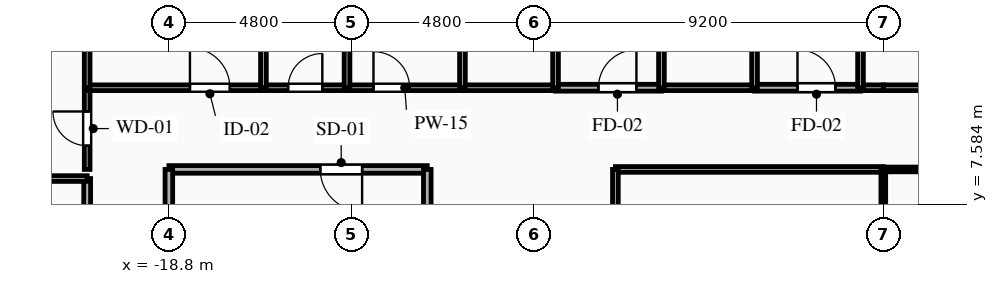
"""IFC4 building model, lengths in metres.
Left out: names, types, materials, properties, quantities, classifications, styles, units other than length and angle.
Written with IfcOpenShell. Run it as: python <this file> out.ifc"""

import sys

from ifc_helpers import new_model, si_unit, direction, frame, frame_2d, origin, place, context, subcontext, project, spatial, rectangle, extrude, element, fill, save


model = new_model("IFC4")
c1 = context("Model", 3, precision=1e-05, world=origin(), true_north=direction((0.0, 1.0)))
c2 = subcontext(c1, "Body", "Model", "MODEL_VIEW")
j1 = project(units=[si_unit("LENGTHUNIT", "METRE"), si_unit("PLANEANGLEUNIT", "RADIAN")], contexts=[c1])
p1 = place(None, origin())
s1 = spatial("IfcSite", under=j1, at=p1, CompositionType="ELEMENT")
p2 = place(p1, origin())
s2 = spatial("IfcBuilding", under=s1, at=p2, CompositionType="ELEMENT")
p3 = place(p2, frame((0.0, 0.0, 144.4)))
s3 = spatial("IfcBuildingStorey", under=s2, at=p3, CompositionType="ELEMENT", Elevation=144.4)
p4 = place(p3, frame((-12.0, 8.5, 0.0), z_axis=(0.0, 0.0, 1.0), x_axis=(-1.0, 0.0, 0.0)))
e1 = element("IfcWall", 1, at=p4, inside=s3, PredefinedType="PARTITIONING", context=c2, shape_type="SweptSolid", body=[
    extrude(rectangle(XDim=6.8, YDim=0.2, at=frame_2d((3.4, 0.0))), origin(), (0.0, 0.0, 1.0), 3.04),
])
p5 = place(p4, frame((1.715, 0.0, 0.0)))
e2 = element("IfcOpeningElement", 2, at=p5, cuts=e1, PredefinedType="OPENING", context=c2, shape_type="SweptSolid", body=[
    extrude(rectangle(XDim=1.1, YDim=2.15, at=frame_2d((0.55, 1.075))), frame((0.0, 0.11, 0.0), z_axis=(0.0, -1.0, 0.0), x_axis=(1.0, 0.0, 0.0)), (0.0, 0.0, 1.0), 0.22),
])
p6 = place(p3, frame((-18.8, 8.5, 0.0), z_axis=(0.0, 0.0, 1.0), x_axis=(0.0, -1.0, 0.0)))
e3 = element("IfcWall", 3, at=p6, inside=s3, PredefinedType="PARTITIONING", context=c2, shape_type="SweptSolid", body=[
    extrude(rectangle(XDim=2.9, YDim=0.2, at=frame_2d((1.45, 0.0))), origin(), (0.0, 0.0, 1.0), 2.525),
])
p7 = place(p3, frame((-12.0, 5.6, 0.0), z_axis=(0.0, 0.0, 1.0), x_axis=(0.0, 1.0, 0.0)))
e4 = element("IfcWall", 4, at=p7, inside=s3, PredefinedType="PARTITIONING", context=c2, shape_type="SweptSolid", body=[
    extrude(rectangle(XDim=2.9, YDim=0.2, at=frame_2d((1.45, 0.0))), origin(), (0.0, 0.0, 1.0), 3.04),
])
p8 = place(p3, frame((-20.95, 8.5, 0.0), z_axis=(0.0, 0.0, 1.0), x_axis=(0.0, 1.0, 0.0)))
e5 = element("IfcWall", 5, at=p8, inside=s3, PredefinedType="PARTITIONING", context=c2, shape_type="SweptSolid", body=[
    extrude(rectangle(XDim=2.15, YDim=0.15, at=frame_2d((1.075, 0.0))), origin(), (0.0, 0.0, 1.0), 3.04),
])
p9 = place(p8, frame((0.625, 0.0, 0.0)))
e6 = element("IfcOpeningElement", 6, at=p9, cuts=e5, PredefinedType="OPENING", context=c2, shape_type="SweptSolid", body=[
    extrude(rectangle(XDim=0.9, YDim=2.1, at=frame_2d((0.45, 1.05))), frame((0.0, 0.085, 0.0), z_axis=(0.0, -1.0, 0.0), x_axis=(1.0, 0.0, 0.0)), (0.0, 0.0, 1.0), 0.17),
])
p10 = place(p3, frame((-20.95, 10.65, 0.0), z_axis=(0.0, 0.0, 1.0), x_axis=(1.0, 0.0, 0.0)))
e7 = element("IfcWall", 7, at=p10, inside=s3, PredefinedType="PARTITIONING", context=c2, shape_type="SweptSolid", body=[
    extrude(rectangle(XDim=4.638, YDim=0.15, at=frame_2d((2.319, 0.0))), origin(), (0.0, 0.0, 1.0), 3.04),
])
p11 = place(p10, frame((2.705, 0.0, 0.0)))
e8 = element("IfcOpeningElement", 8, at=p11, cuts=e7, PredefinedType="OPENING", context=c2, shape_type="SweptSolid", body=[
    extrude(rectangle(XDim=1.05, YDim=2.15, at=frame_2d((0.525, 1.075))), frame((0.0, 0.085, 0.0), z_axis=(0.0, -1.0, 0.0), x_axis=(1.0, 0.0, 0.0)), (0.0, 0.0, 1.0), 0.17),
])
p12 = place(p3, frame((-16.312, 10.65, 0.0), z_axis=(0.0, 0.0, 1.0), x_axis=(1.0, 0.0, 0.0)))
e9 = element("IfcWall", 9, at=p12, inside=s3, PredefinedType="PLUMBINGWALL", context=c2, shape_type="SweptSolid", body=[
    extrude(rectangle(XDim=2.2, YDim=0.15, at=frame_2d((1.1, 0.0))), origin(), (0.0, 0.0, 1.0), 3.04),
])
p13 = place(p12, frame((0.65, 0.0, 0.0)))
e10 = element("IfcOpeningElement", 10, at=p13, cuts=e9, PredefinedType="OPENING", context=c2, shape_type="SweptSolid", body=[
    extrude(rectangle(XDim=0.9, YDim=2.1, at=frame_2d((0.45, 1.05))), frame((0.0, 0.085, 0.0), z_axis=(0.0, -1.0, 0.0), x_axis=(1.0, 0.0, 0.0)), (0.0, 0.0, 1.0), 0.17),
])
p14 = place(p3, frame((-14.112, 10.65, 0.0), z_axis=(0.0, 0.0, 1.0), x_axis=(1.0, 0.0, 0.0)))
e11 = element("IfcWall", 11, at=p14, inside=s3, PredefinedType="PARTITIONING", context=c2, shape_type="SweptSolid", body=[
    extrude(rectangle(XDim=3.037, YDim=0.15, at=frame_2d((1.519, 0.0))), origin(), (0.0, 0.0, 1.0), 3.04),
])
p15 = place(p14, frame((0.696, 0.0, 0.0)))
e12 = element("IfcOpeningElement", 12, at=p15, cuts=e11, PredefinedType="OPENING", context=c2, shape_type="SweptSolid", body=[
    extrude(rectangle(XDim=0.95, YDim=2.1, at=frame_2d((0.475, 1.05))), frame((0.0, 0.085, 0.0), z_axis=(0.0, -1.0, 0.0), x_axis=(1.0, 0.0, 0.0)), (0.0, 0.0, 1.0), 0.17),
])
p16 = place(p3, frame((-8.625, 10.65, 0.0), z_axis=(0.0, 0.0, 1.0), x_axis=(1.0, 0.0, 0.0)))
e13 = element("IfcWall", 13, at=p16, inside=s3, PredefinedType="PARTITIONING", context=c2, shape_type="SweptSolid", body=[
    extrude(rectangle(XDim=2.787, YDim=0.18, at=frame_2d((1.394, 0.0))), origin(), (0.0, 0.0, 1.0), 3.04),
])
p17 = place(p16, frame((1.129, 0.0, 0.0)))
e14 = element("IfcOpeningElement", 14, at=p17, cuts=e13, PredefinedType="OPENING", context=c2, shape_type="SweptSolid", body=[
    extrude(rectangle(XDim=1.0, YDim=2.15, at=frame_2d((0.5, 1.075))), frame((0.0, 0.1, 0.0), z_axis=(0.0, -1.0, 0.0), x_axis=(1.0, 0.0, 0.0)), (0.0, 0.0, 1.0), 0.2),
])
p18 = place(p3, frame((-11.075, 10.65, 0.0), z_axis=(0.0, 0.0, 1.0), x_axis=(1.0, 0.0, 0.0)))
e15 = element("IfcWall", 15, at=p18, inside=s3, PredefinedType="PLUMBINGWALL", context=c2, shape_type="SweptSolid", body=[
    extrude(rectangle(XDim=2.45, YDim=0.15, at=frame_2d((1.225, 0.0))), origin(), (0.0, 0.0, 1.0), 3.04),
])
p19 = place(p3, frame((-3.388, 10.65, 0.0), z_axis=(0.0, 0.0, 1.0), x_axis=(1.0, 0.0, 0.0)))
e16 = element("IfcWall", 16, at=p19, inside=s3, PredefinedType="PARTITIONING", context=c2, shape_type="SweptSolid", body=[
    extrude(rectangle(XDim=2.788, YDim=0.18, at=frame_2d((1.394, 0.0))), origin(), (0.0, 0.0, 1.0), 3.04),
])
p20 = place(p19, frame((1.129, 0.0, 0.0)))
e17 = element("IfcOpeningElement", 17, at=p20, cuts=e16, PredefinedType="OPENING", context=c2, shape_type="SweptSolid", body=[
    extrude(rectangle(XDim=1.0, YDim=2.15, at=frame_2d((0.5, 1.075))), frame((0.0, 0.1, 0.0), z_axis=(0.0, -1.0, 0.0), x_axis=(1.0, 0.0, 0.0)), (0.0, 0.0, 1.0), 0.2),
])
p21 = place(p3, frame((-5.838, 10.65, 0.0), z_axis=(0.0, 0.0, 1.0), x_axis=(1.0, 0.0, 0.0)))
e18 = element("IfcWall", 18, at=p21, inside=s3, PredefinedType="PLUMBINGWALL", context=c2, shape_type="SweptSolid", body=[
    extrude(rectangle(XDim=2.45, YDim=0.15, at=frame_2d((1.225, 0.0))), origin(), (0.0, 0.0, 1.0), 3.04),
])
p22 = place(p3, frame((-0.6, 10.65, 0.0), z_axis=(0.0, 0.0, 1.0), x_axis=(1.0, 0.0, 0.0)))
e19 = element("IfcWall", 19, at=p22, inside=s3, PredefinedType="PLUMBINGWALL", context=c2, shape_type="SweptSolid", body=[
    extrude(rectangle(XDim=0.6, YDim=0.15, at=frame_2d((0.3, 0.0))), origin(), (0.0, 0.0, 1.0), 3.04),
])
p23 = place(p3, frame((0.0, 8.5, 0.0), z_axis=(0.0, 0.0, 1.0), x_axis=(-1.0, 0.0, 0.0)))
e20 = element("IfcWall", 20, at=p23, inside=s3, PredefinedType="PARTITIONING", context=c2, shape_type="SweptSolid", body=[
    extrude(rectangle(XDim=7.05, YDim=0.15, at=frame_2d((3.525, 0.0))), origin(), (0.0, 0.0, 1.0), 3.04),
])
p24 = place(p3, frame((0.0, 10.65, 0.0), z_axis=(0.0, 0.0, 1.0), x_axis=(1.0, 0.0, 0.0)))
e21 = element("IfcWall", 21, at=p24, inside=s3, PredefinedType="PLUMBINGWALL", context=c2, shape_type="SweptSolid", body=[
    extrude(rectangle(XDim=1.85, YDim=0.15, at=frame_2d((0.925, 0.0))), origin(), (0.0, 0.0, 1.0), 3.04),
])
p25 = place(p3, frame((7.05, 8.5, 0.0), z_axis=(0.0, 0.0, 1.0), x_axis=(-1.0, 0.0, 0.0)))
e22 = element("IfcWall", 22, at=p25, inside=s3, PredefinedType="PARTITIONING", context=c2, shape_type="SweptSolid", body=[
    extrude(rectangle(XDim=7.05, YDim=0.125, at=frame_2d((3.525, 0.0))), origin(), (0.0, 0.0, 1.0), 3.04),
])
p26 = place(p3, frame((-20.95, -1.31, 0.0), z_axis=(0.0, 0.0, 1.0), x_axis=(0.0, 1.0, 0.0)))
e23 = element("IfcWall", 23, at=p26, inside=s3, PredefinedType="PARTITIONING", context=c2, shape_type="SweptSolid", body=[
    extrude(rectangle(XDim=9.57, YDim=0.18, at=frame_2d((4.785, 0.0))), origin(), (0.0, 0.0, 1.0), 3.04),
])
p27 = place(p26, frame((1.506, 0.0, 0.0)))
e24 = element("IfcOpeningElement", 24, at=p27, cuts=e23, PredefinedType="OPENING", context=c2, shape_type="SweptSolid", body=[
    extrude(rectangle(XDim=1.0, YDim=2.15, at=frame_2d((0.5, 1.075))), frame((0.0, 0.1, 0.0), z_axis=(0.0, -1.0, 0.0), x_axis=(1.0, 0.0, 0.0)), (0.0, 0.0, 1.0), 0.2),
])
p28 = place(p3, frame((-7.05, 8.5, 0.0), z_axis=(0.0, 0.0, 1.0), x_axis=(0.0, -1.0, 0.0)))
e25 = element("IfcWall", 25, at=p28, inside=s3, PredefinedType="PARTITIONING", context=c2, shape_type="SweptSolid", body=[
    extrude(rectangle(XDim=9.3, YDim=0.15, at=frame_2d((4.65, 0.0))), origin(), (0.0, 0.0, 1.0), 3.04),
])
p29 = place(p28, frame((6.784, 0.0, 0.0)))
e26 = element("IfcOpeningElement", 26, at=p29, cuts=e25, PredefinedType="OPENING", context=c2, shape_type="SweptSolid", body=[
    extrude(rectangle(XDim=1.05, YDim=2.15, at=frame_2d((0.525, 1.075))), frame((0.0, 0.085, 0.0), z_axis=(0.0, -1.0, 0.0), x_axis=(1.0, 0.0, 0.0)), (0.0, 0.0, 1.0), 0.17),
])
p30 = place(p3, frame((-24.765, 8.26, 0.0), z_axis=(0.0, 0.0, 1.0), x_axis=(1.0, 0.0, 0.0)))
e27 = element("IfcWall", 27, at=p30, inside=s3, PredefinedType="PARTITIONING", context=c2, shape_type="SweptSolid", body=[
    extrude(rectangle(XDim=3.815, YDim=0.15, at=frame_2d((1.907, 0.0))), origin(), (0.0, 0.0, 1.0), 3.04),
])
p31 = place(p3, frame((-20.95, 20.4, 0.0), z_axis=(0.0, 0.0, 1.0), x_axis=(0.0, -1.0, 0.0)))
e28 = element("IfcWall", 28, at=p31, inside=s3, PredefinedType="PARTITIONING", context=c2, shape_type="SweptSolid", body=[
    extrude(rectangle(XDim=9.75, YDim=0.15, at=frame_2d((4.875, 0.0))), origin(), (0.0, 0.0, 1.0), 3.04),
])
for number, where, z_axis, x_axis in (
    (29, (-16.312, 20.4, 0.0), (0.0, 0.0, 1.0), (0.0, -1.0, 0.0)),
    (30, (-14.112, 20.4, 0.0), (0.0, 0.0, 1.0), (0.0, -1.0, 0.0)),
):
    element("IfcWall", number, at=place(p3, frame(where, z_axis=z_axis, x_axis=x_axis)), inside=s3, PredefinedType="PLUMBINGWALL", context=c2, shape_type="SweptSolid", body=[
        extrude(rectangle(XDim=9.75, YDim=0.15, at=frame_2d((4.875, 0.0))), origin(), (0.0, 0.0, 1.0), 3.04),
    ])
for number, where, z_axis, x_axis in (
    (31, (-11.075, 12.8, 0.0), (0.0, 0.0, 1.0), (0.0, -1.0, 0.0)),
    (32, (-8.625, 10.65, 0.0), (0.0, 0.0, 1.0), (0.0, 1.0, 0.0)),
    (33, (-5.838, 12.8, 0.0), (0.0, 0.0, 1.0), (0.0, -1.0, 0.0)),
    (34, (-3.388, 10.65, 0.0), (0.0, 0.0, 1.0), (0.0, 1.0, 0.0)),
    (35, (-0.6, 12.8, 0.0), (0.0, 0.0, 1.0), (0.0, -1.0, 0.0)),
):
    element("IfcWall", number, at=place(p3, frame(where, z_axis=z_axis, x_axis=x_axis)), inside=s3, PredefinedType="PLUMBINGWALL", context=c2, shape_type="SweptSolid", body=[
        extrude(rectangle(XDim=2.15, YDim=0.15, at=frame_2d((1.075, 0.0))), origin(), (0.0, 0.0, 1.0), 3.04),
    ])
p32 = place(p3, frame((0.0, 8.5, 0.0), z_axis=(0.0, 0.0, 1.0), x_axis=(0.0, -1.0, 0.0)))
e36 = element("IfcWall", 36, at=p32, inside=s3, PredefinedType="PARTITIONING", context=c2, shape_type="SweptSolid", body=[
    extrude(rectangle(XDim=9.3, YDim=0.125, at=frame_2d((4.65, 0.0))), origin(), (0.0, 0.0, 1.0), 3.04),
])
p33 = place(p5, origin())
e37 = element("IfcDoor", 37, at=p33, inside=s3, OperationType="SINGLE_SWING_LEFT", PredefinedType="DOOR", context=c2, shape_type="SweptSolid", body=[
    extrude(rectangle(XDim=1.1, YDim=2.15, at=frame_2d((0.55, 1.075))), frame((0.0, 0.025, 0.0), z_axis=(0.0, -1.0, 0.0), x_axis=(1.0, 0.0, 0.0)), (0.0, 0.0, 1.0), 0.05),
])
fill(e2, e37)
p34 = place(p9, origin())
e38 = element("IfcDoor", 38, at=p34, inside=s3, OperationType="SINGLE_SWING_RIGHT", PredefinedType="DOOR", context=c2, shape_type="SweptSolid", body=[
    extrude(rectangle(XDim=0.9, YDim=2.1, at=frame_2d((0.45, 1.05))), frame((0.0, 0.025, 0.0), z_axis=(0.0, -1.0, 0.0), x_axis=(1.0, 0.0, 0.0)), (0.0, 0.0, 1.0), 0.05),
])
fill(e6, e38)
p35 = place(p11, origin())
e39 = element("IfcDoor", 39, at=p35, inside=s3, OperationType="SINGLE_SWING_LEFT", PredefinedType="DOOR", context=c2, shape_type="SweptSolid", body=[
    extrude(rectangle(XDim=1.05, YDim=2.15, at=frame_2d((0.525, 1.075))), frame((0.0, 0.025, 0.0), z_axis=(0.0, -1.0, 0.0), x_axis=(1.0, 0.0, 0.0)), (0.0, 0.0, 1.0), 0.05),
])
fill(e8, e39)
p36 = place(p13, origin())
e40 = element("IfcDoor", 40, at=p36, inside=s3, OperationType="SINGLE_SWING_RIGHT", PredefinedType="DOOR", context=c2, shape_type="SweptSolid", body=[
    extrude(rectangle(XDim=0.9, YDim=2.1, at=frame_2d((0.45, 1.05))), frame((0.0, 0.025, 0.0), z_axis=(0.0, -1.0, 0.0), x_axis=(1.0, 0.0, 0.0)), (0.0, 0.0, 1.0), 0.05),
])
fill(e10, e40)
p37 = place(p15, origin())
e41 = element("IfcDoor", 41, at=p37, inside=s3, OperationType="SINGLE_SWING_LEFT", PredefinedType="DOOR", context=c2, shape_type="SweptSolid", body=[
    extrude(rectangle(XDim=0.95, YDim=2.1, at=frame_2d((0.475, 1.05))), frame((0.0, 0.025, 0.0), z_axis=(0.0, -1.0, 0.0), x_axis=(1.0, 0.0, 0.0)), (0.0, 0.0, 1.0), 0.05),
])
fill(e12, e41)
p38 = place(p17, origin())
e42 = element("IfcDoor", 42, at=p38, inside=s3, OperationType="SINGLE_SWING_RIGHT", PredefinedType="DOOR", context=c2, shape_type="SweptSolid", body=[
    extrude(rectangle(XDim=1.0, YDim=2.15, at=frame_2d((0.5, 1.075))), frame((0.0, 0.025, 0.0), z_axis=(0.0, -1.0, 0.0), x_axis=(1.0, 0.0, 0.0)), (0.0, 0.0, 1.0), 0.05),
])
fill(e14, e42)
p39 = place(p20, origin())
e43 = element("IfcDoor", 43, at=p39, inside=s3, OperationType="SINGLE_SWING_LEFT", PredefinedType="DOOR", context=c2, shape_type="SweptSolid", body=[
    extrude(rectangle(XDim=1.0, YDim=2.15, at=frame_2d((0.5, 1.075))), frame((0.0, 0.025, 0.0), z_axis=(0.0, -1.0, 0.0), x_axis=(1.0, 0.0, 0.0)), (0.0, 0.0, 1.0), 0.05),
])
fill(e17, e43)
save(model, sys.argv[1])
